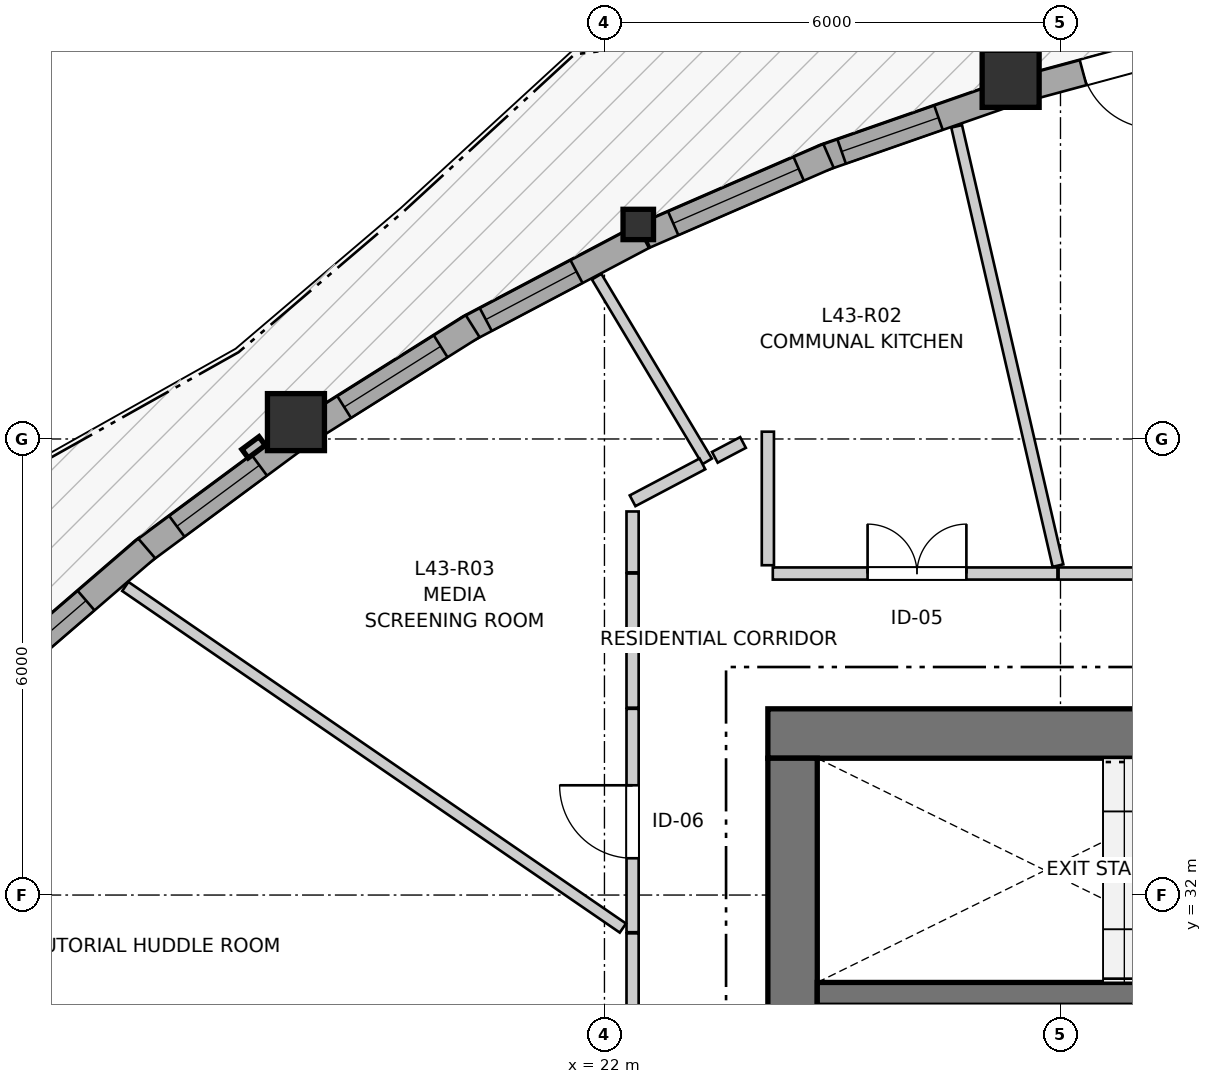
"""IFC4 building model, lengths in metres.
Left out: names, types, materials, properties, quantities, classifications, styles, units other than length and angle.
Written with IfcOpenShell. Run it as: python <this file> out.ifc"""

import sys

from ifc_helpers import new_model, si_unit, direction, frame, frame_2d, origin, origin_2d, place, context, subcontext, project, spatial, rectangle, i_section, extrude, source, transform, mapped, element, fill, save


model = new_model("IFC4")
c1 = context("Model", 3, precision=1e-05, world=origin(), true_north=direction((0.0, 1.0)))
c2 = subcontext(c1, "Body", "Model", "MODEL_VIEW")
j1 = project(units=[si_unit("LENGTHUNIT", "METRE"), si_unit("PLANEANGLEUNIT", "RADIAN")], contexts=[c1])
p1 = place(None, origin())
s1 = spatial("IfcSite", under=j1, at=p1, CompositionType="ELEMENT")
p2 = place(p1, origin())
s2 = spatial("IfcBuilding", under=s1, at=p2, CompositionType="ELEMENT")
p3 = place(p2, frame((0.0, 0.0, 145.8)))
s3 = spatial("IfcBuildingStorey", under=s2, at=p3, CompositionType="ELEMENT", Elevation=145.8)
p4 = place(p3, frame((36.55, 34.125, 0.0), z_axis=(0.0, 0.0, 1.0), x_axis=(-1.0, 0.0, 0.0)))
e1 = element("IfcWall", 1, at=p4, inside=s3, PredefinedType="SHEAR", context=c2, shape_type="SweptSolid", body=[
    extrude(rectangle(XDim=12.4, YDim=0.65, at=frame_2d((6.2, 0.0))), origin(), (0.0, 0.0, 1.0), 2.95),
])
p5 = place(p3, frame((24.475, 33.8, 0.0), z_axis=(0.0, 0.0, 1.0), x_axis=(0.0, -1.0, 0.0)))
e2 = element("IfcWall", 2, at=p5, inside=s3, PredefinedType="SHEAR", context=c2, shape_type="SweptSolid", body=[
    extrude(rectangle(XDim=15.6, YDim=0.65, at=frame_2d((7.8, 0.0))), origin(), (0.0, 0.0, 1.0), 2.95),
])
p6 = place(p5, frame((7.05, 0.0, 0.0)))
e3 = element("IfcOpeningElement", 3, at=p6, cuts=e2, PredefinedType="OPENING", context=c2, shape_type="SweptSolid", body=[
    extrude(rectangle(XDim=1.5, YDim=2.15, at=frame_2d((0.75, 1.075))), frame((0.0, 0.335, 0.0), z_axis=(0.0, -1.0, 0.0), x_axis=(1.0, 0.0, 0.0)), (0.0, 0.0, 1.0), 0.67),
])
p7 = place(p5, frame((3.52, 0.0, 0.0)))
e4 = element("IfcOpeningElement", 4, at=p7, cuts=e2, PredefinedType="OPENING", context=c2, shape_type="SweptSolid", body=[
    extrude(rectangle(XDim=0.86, YDim=2.05, at=frame_2d((0.43, 1.025))), frame((0.0, 0.335, 0.0), z_axis=(0.0, -1.0, 0.0), x_axis=(1.0, 0.0, 0.0)), (0.0, 0.0, 1.0), 0.67),
])
p8 = place(p5, frame((11.22, 0.0, 0.0)))
e5 = element("IfcOpeningElement", 5, at=p8, cuts=e2, PredefinedType="OPENING", context=c2, shape_type="SweptSolid", body=[
    extrude(rectangle(XDim=0.86, YDim=2.05, at=frame_2d((0.43, 1.025))), frame((0.0, 0.335, 0.0), z_axis=(0.0, -1.0, 0.0), x_axis=(1.0, 0.0, 0.0)), (0.0, 0.0, 1.0), 0.67),
])
p9 = place(p3, frame((24.8, 30.7, 0.0), z_axis=(0.0, 0.0, 1.0), x_axis=(1.0, 0.0, 0.0)))
e6 = element("IfcWall", 6, at=p9, inside=s3, PredefinedType="SHEAR", context=c2, shape_type="SweptSolid", body=[
    extrude(rectangle(XDim=11.1, YDim=0.3, at=frame_2d((5.55, 0.0))), origin(), (0.0, 0.0, 1.0), 2.95),
])
p10 = place(p9, frame((6.22, 0.0, 0.0)))
e7 = element("IfcOpeningElement", 7, at=p10, cuts=e6, PredefinedType="OPENING", context=c2, shape_type="SweptSolid", body=[
    extrude(rectangle(XDim=0.98, YDim=2.15, at=frame_2d((0.49, 1.075))), frame((0.0, 0.16, 0.0), z_axis=(0.0, -1.0, 0.0), x_axis=(1.0, 0.0, 0.0)), (0.0, 0.0, 1.0), 0.32),
])
p11 = place(p9, frame((9.15, 0.0, 0.0)))
e8 = element("IfcOpeningElement", 8, at=p11, cuts=e6, PredefinedType="OPENING", context=c2, shape_type="SweptSolid", body=[
    extrude(rectangle(XDim=1.15, YDim=2.15, at=frame_2d((0.575, 1.075))), frame((0.0, 0.16, 0.0), z_axis=(0.0, -1.0, 0.0), x_axis=(1.0, 0.0, 0.0)), (0.0, 0.0, 1.0), 0.32),
])
m1 = source(origin(), c2, "Body", "SweptSolid", [
    extrude(rectangle(XDim=0.75, YDim=0.75, at=origin_2d()), origin(), (0.0, 0.0, 1.0), 2.95),
])
p12 = place(p3, frame((27.344, 42.738, 0.0), z_axis=(0.0, 0.0, 1.0), x_axis=(1.0, 0.0, 0.0)))
e9 = element("IfcColumn", 9, at=p12, inside=s3, PredefinedType="COLUMN", context=c2, shape_type="MappedRepresentation", body=[
    mapped(m1, transform((0.0, 0.0, 0.0), x_axis=(1.0, 0.0, 0.0), y_axis=(0.0, 1.0, 0.0), z_axis=(0.0, 0.0, 1.0), scale=1.0)),
])
m2 = source(origin(), c2, "Body", "SweptSolid", [
    extrude(i_section(OverallWidth=0.401, OverallDepth=0.399, WebThickness=0.023, FlangeThickness=0.036, FilletRadius=0.015, at=origin_2d()), origin(), (0.0, 0.0, 1.0), 2.95),
])
p13 = place(p3, frame((22.445, 40.822, 0.0), z_axis=(0.0, 0.0, 1.0), x_axis=(1.0, 0.0, 0.0)))
e10 = element("IfcColumn", 10, at=p13, inside=s3, PredefinedType="PILASTER", context=c2, shape_type="MappedRepresentation", body=[
    mapped(m2, transform((0.0, 0.0, 0.0), x_axis=(1.0, 0.0, 0.0), y_axis=(0.0, 1.0, 0.0), z_axis=(0.0, 0.0, 1.0), scale=1.0)),
])
p14 = place(p3, frame((17.941, 38.222, 0.0), z_axis=(0.0, 0.0, 1.0), x_axis=(1.0, 0.0, 0.0)))
e11 = element("IfcColumn", 11, at=p14, inside=s3, PredefinedType="COLUMN", context=c2, shape_type="MappedRepresentation", body=[
    mapped(m1, transform((0.0, 0.0, 0.0), x_axis=(1.0, 0.0, 0.0), y_axis=(0.0, 1.0, 0.0), z_axis=(0.0, 0.0, 1.0), scale=1.0)),
])
p15 = place(p3, frame((30.023, 43.285, 0.0), z_axis=(0.0, 0.0, 1.0), x_axis=(-0.965478241218, -0.260483714913, 0.0)))
e12 = element("IfcWall", 12, at=p15, inside=s3, PredefinedType="SOLIDWALL", context=c2, shape_type="SweptSolid", body=[
    extrude(rectangle(XDim=2.574, YDim=0.34, at=frame_2d((1.287, 0.0))), origin(), (0.0, 0.0, 1.0), 2.53),
])
p16 = place(p15, frame((0.787, 0.0, 0.0)))
e13 = element("IfcOpeningElement", 13, at=p16, cuts=e12, PredefinedType="OPENING", context=c2, shape_type="SweptSolid", body=[
    extrude(rectangle(XDim=1.0, YDim=2.1, at=frame_2d((0.5, 1.05))), frame((0.0, 0.18, 0.0), z_axis=(0.0, -1.0, 0.0), x_axis=(1.0, 0.0, 0.0)), (0.0, 0.0, 1.0), 0.36),
])
p17 = place(p3, frame((27.254, 42.527, 0.0), z_axis=(0.0, 0.0, 1.0), x_axis=(-0.944140843313, -0.329542209721, 0.0)))
e14 = element("IfcWall", 14, at=p17, inside=s3, PredefinedType="SOLIDWALL", context=c2, shape_type="SweptSolid", body=[
    extrude(rectangle(XDim=2.53, YDim=0.34, at=frame_2d((1.265, 0.0))), origin(), (0.0, 0.0, 1.0), 2.53),
])
p18 = place(p17, frame((0.909, 0.0, 0.82)))
e15 = element("IfcOpeningElement", 15, at=p18, cuts=e14, PredefinedType="OPENING", context=c2, shape_type="SweptSolid", body=[
    extrude(rectangle(XDim=1.35, YDim=1.45, at=frame_2d((0.675, 0.725))), frame((0.0, 0.18, 0.0), z_axis=(0.0, -1.0, 0.0), x_axis=(1.0, 0.0, 0.0)), (0.0, 0.0, 1.0), 0.36),
])
p19 = place(p3, frame((24.948, 41.725, 0.0), z_axis=(0.0, 0.0, 1.0), x_axis=(-0.917067110524, -0.398732886523, 0.0)))
e16 = element("IfcWall", 16, at=p19, inside=s3, PredefinedType="SOLIDWALL", context=c2, shape_type="SweptSolid", body=[
    extrude(rectangle(XDim=2.635, YDim=0.34, at=frame_2d((1.318, 0.0))), origin(), (0.0, 0.0, 1.0), 2.53),
])
p20 = place(p19, frame((0.427, 0.0, 0.82)))
e17 = element("IfcOpeningElement", 17, at=p20, cuts=e16, PredefinedType="OPENING", context=c2, shape_type="SweptSolid", body=[
    extrude(rectangle(XDim=1.8, YDim=1.45, at=frame_2d((0.9, 0.725))), frame((0.0, 0.18, 0.0), z_axis=(0.0, -1.0, 0.0), x_axis=(1.0, 0.0, 0.0)), (0.0, 0.0, 1.0), 0.36),
])
p21 = place(p3, frame((22.507, 40.663, 0.0), z_axis=(0.0, 0.0, 1.0), x_axis=(-0.884410392718, -0.466710035517, 0.0)))
e18 = element("IfcWall", 18, at=p21, inside=s3, PredefinedType="SOLIDWALL", context=c2, shape_type="SweptSolid", body=[
    extrude(rectangle(XDim=2.62, YDim=0.34, at=frame_2d((1.31, 0.0))), origin(), (0.0, 0.0, 1.0), 2.53),
])
p22 = place(p21, frame((0.988, 0.0, 0.82)))
e19 = element("IfcOpeningElement", 19, at=p22, cuts=e18, PredefinedType="OPENING", context=c2, shape_type="SweptSolid", body=[
    extrude(rectangle(XDim=1.35, YDim=1.45, at=frame_2d((0.675, 0.725))), frame((0.0, 0.18, 0.0), z_axis=(0.0, -1.0, 0.0), x_axis=(1.0, 0.0, 0.0)), (0.0, 0.0, 1.0), 0.36),
])
p23 = place(p3, frame((20.266, 39.484, 0.0), z_axis=(0.0, 0.0, 1.0), x_axis=(-0.84647717658, -0.532425008363, 0.0)))
e20 = element("IfcWall", 20, at=p23, inside=s3, PredefinedType="SOLIDWALL", context=c2, shape_type="SweptSolid", body=[
    extrude(rectangle(XDim=2.485, YDim=0.34, at=frame_2d((1.243, 0.0))), origin(), (0.0, 0.0, 1.0), 2.53),
])
p24 = place(p23, frame((0.498, 0.0, 0.82)))
e21 = element("IfcOpeningElement", 21, at=p24, cuts=e20, PredefinedType="OPENING", context=c2, shape_type="SweptSolid", body=[
    extrude(rectangle(XDim=1.5, YDim=1.45, at=frame_2d((0.75, 0.725))), frame((0.0, 0.18, 0.0), z_axis=(0.0, -1.0, 0.0), x_axis=(1.0, 0.0, 0.0)), (0.0, 0.0, 1.0), 0.36),
])
p25 = place(p3, frame((17.917, 37.993, 0.0), z_axis=(0.0, 0.0, 1.0), x_axis=(-0.803792400414, -0.594909889846, 0.0)))
e22 = element("IfcWall", 22, at=p25, inside=s3, PredefinedType="SOLIDWALL", context=c2, shape_type="SweptSolid", body=[
    extrude(rectangle(XDim=2.5, YDim=0.34, at=frame_2d((1.25, 0.0))), origin(), (0.0, 0.0, 1.0), 2.53),
])
p26 = place(p25, frame((0.57, 0.0, 0.82)))
e23 = element("IfcOpeningElement", 23, at=p26, cuts=e22, PredefinedType="OPENING", context=c2, shape_type="SweptSolid", body=[
    extrude(rectangle(XDim=1.35, YDim=1.45, at=frame_2d((0.675, 0.725))), frame((0.0, 0.18, 0.0), z_axis=(0.0, -1.0, 0.0), x_axis=(1.0, 0.0, 0.0)), (0.0, 0.0, 1.0), 0.36),
])
p27 = place(p3, frame((15.977, 36.561, 0.0), z_axis=(0.0, 0.0, 1.0), x_axis=(-0.757481825022, -0.652856251223, 0.0)))
e24 = element("IfcWall", 24, at=p27, inside=s3, PredefinedType="SOLIDWALL", context=c2, shape_type="SweptSolid", body=[
    extrude(rectangle(XDim=2.665, YDim=0.34, at=frame_2d((1.333, 0.0))), origin(), (0.0, 0.0, 1.0), 2.53),
])
p28 = place(p27, frame((1.052, 0.0, 0.82)))
e25 = element("IfcOpeningElement", 25, at=p28, cuts=e24, PredefinedType="OPENING", context=c2, shape_type="SweptSolid", body=[
    extrude(rectangle(XDim=1.05, YDim=1.45, at=frame_2d((0.525, 0.725))), frame((0.0, 0.18, 0.0), z_axis=(0.0, -1.0, 0.0), x_axis=(1.0, 0.0, 0.0)), (0.0, 0.0, 1.0), 0.36),
])
p29 = place(p3, frame((27.975, 36.23, 0.0), z_axis=(0.0, 0.0, 1.0), x_axis=(1.0, 0.0, 0.0)))
e26 = element("IfcWall", 26, at=p29, inside=s3, PredefinedType="PARTITIONING", context=c2, shape_type="SweptSolid", body=[
    extrude(rectangle(XDim=5.775, YDim=0.16, at=frame_2d((2.887, 0.0))), origin(), (0.0, 0.0, 1.0), 2.588),
])
p30 = place(p29, frame((2.407, 0.0, 0.0)))
e27 = element("IfcOpeningElement", 27, at=p30, cuts=e26, PredefinedType="OPENING", context=c2, shape_type="SweptSolid", body=[
    extrude(rectangle(XDim=0.96, YDim=2.1, at=frame_2d((0.48, 1.05))), frame((0.0, 0.09, 0.0), z_axis=(0.0, -1.0, 0.0), x_axis=(1.0, 0.0, 0.0)), (0.0, 0.0, 1.0), 0.18),
])
p31 = place(p3, frame((24.215, 36.23, 0.0), z_axis=(0.0, 0.0, 1.0), x_axis=(1.0, 0.0, 0.0)))
e28 = element("IfcWall", 28, at=p31, inside=s3, PredefinedType="PARTITIONING", context=c2, shape_type="SweptSolid", body=[
    extrude(rectangle(XDim=3.745, YDim=0.16, at=frame_2d((1.873, 0.0))), origin(), (0.0, 0.0, 1.0), 2.95),
])
p32 = place(p31, frame((1.247, 0.0, 0.0)))
e29 = element("IfcOpeningElement", 29, at=p32, cuts=e28, PredefinedType="OPENING", context=c2, shape_type="SweptSolid", body=[
    extrude(rectangle(XDim=1.3, YDim=2.1, at=frame_2d((0.65, 1.05))), frame((0.0, 0.09, 0.0), z_axis=(0.0, -1.0, 0.0), x_axis=(1.0, 0.0, 0.0)), (0.0, 0.0, 1.0), 0.18),
])
p33 = place(p3, frame((22.37, 27.85, 0.0), z_axis=(0.0, 0.0, 1.0), x_axis=(0.0, 1.0, 0.0)))
e30 = element("IfcWall", 30, at=p33, inside=s3, PredefinedType="PARTITIONING", context=c2, shape_type="SweptSolid", body=[
    extrude(rectangle(XDim=3.646, YDim=0.16, at=frame_2d((1.823, 0.0))), origin(), (0.0, 0.0, 1.0), 2.95),
])
p34 = place(p33, frame((1.194, 0.0, 0.0)))
e31 = element("IfcOpeningElement", 31, at=p34, cuts=e30, PredefinedType="OPENING", context=c2, shape_type="SweptSolid", body=[
    extrude(rectangle(XDim=1.3, YDim=2.1, at=frame_2d((0.65, 1.05))), frame((0.0, 0.09, 0.0), z_axis=(0.0, -1.0, 0.0), x_axis=(1.0, 0.0, 0.0)), (0.0, 0.0, 1.0), 0.18),
])
p35 = place(p3, frame((22.37, 31.511, 0.0), z_axis=(0.0, 0.0, 1.0), x_axis=(0.0, 1.0, 0.0)))
e32 = element("IfcWall", 32, at=p35, inside=s3, PredefinedType="PARTITIONING", context=c2, shape_type="SweptSolid", body=[
    extrude(rectangle(XDim=2.939, YDim=0.16, at=frame_2d((1.469, 0.0))), origin(), (0.0, 0.0, 1.0), 2.95),
])
p36 = place(p35, frame((0.973, 0.0, 0.0)))
e33 = element("IfcOpeningElement", 33, at=p36, cuts=e32, PredefinedType="OPENING", context=c2, shape_type="SweptSolid", body=[
    extrude(rectangle(XDim=0.96, YDim=2.1, at=frame_2d((0.48, 1.05))), frame((0.0, 0.09, 0.0), z_axis=(0.0, -1.0, 0.0), x_axis=(1.0, 0.0, 0.0)), (0.0, 0.0, 1.0), 0.18),
])
p37 = place(p3, frame((15.696, 36.06, 0.0), z_axis=(0.0, 0.0, 1.0), x_axis=(0.824423900824, -0.565972818914, 0.0)))
e34 = element("IfcWall", 34, at=p37, inside=s3, PredefinedType="PARTITIONING", context=c2, shape_type="SweptSolid", body=[
    extrude(rectangle(XDim=7.941, YDim=0.145, at=frame_2d((3.97, 0.0))), origin(), (0.0, 0.0, 1.0), 2.95),
])
p38 = place(p3, frame((26.634, 42.113, 0.0), z_axis=(0.0, 0.0, 1.0), x_axis=(0.224790361783, -0.97440714963, 0.0)))
e35 = element("IfcWall", 35, at=p38, inside=s3, PredefinedType="PARTITIONING", context=c2, shape_type="SweptSolid", body=[
    extrude(rectangle(XDim=5.931, YDim=0.145, at=frame_2d((2.966, 0.0))), origin(), (0.0, 0.0, 1.0), 2.95),
])
p39 = place(p3, frame((21.897, 40.135, 0.0), z_axis=(0.0, 0.0, 1.0), x_axis=(0.513392323606, -0.858154020012, 0.0)))
e36 = element("IfcWall", 36, at=p39, inside=s3, PredefinedType="PARTITIONING", context=c2, shape_type="SweptSolid", body=[
    extrude(rectangle(XDim=2.832, YDim=0.145, at=frame_2d((1.416, 0.0))), origin(), (0.0, 0.0, 1.0), 2.95),
])
p40 = place(p3, frame((22.37, 34.465, 0.0), z_axis=(0.0, 0.0, 1.0), x_axis=(0.0, 1.0, 0.0)))
e37 = element("IfcWall", 37, at=p40, inside=s3, PredefinedType="PARTITIONING", context=c2, shape_type="SweptSolid", body=[
    extrude(rectangle(XDim=1.765, YDim=0.16, at=frame_2d((0.882, 0.0))), origin(), (0.0, 0.0, 1.0), 2.95),
])
p41 = place(p3, frame((24.15, 36.339, 0.0), z_axis=(0.0, 0.0, 1.0), x_axis=(0.0, 1.0, 0.0)))
e38 = element("IfcWall", 38, at=p41, inside=s3, PredefinedType="PARTITIONING", context=c2, shape_type="SweptSolid", body=[
    extrude(rectangle(XDim=1.757, YDim=0.16, at=frame_2d((0.878, 0.0))), origin(), (0.0, 0.0, 1.0), 2.95),
])
p42 = place(p3, frame((22.37, 37.187, 0.0), z_axis=(0.0, 0.0, 1.0), x_axis=(0.884244639112, 0.467024001741, 0.0)))
e39 = element("IfcWall", 39, at=p42, inside=s3, PredefinedType="PARTITIONING", context=c2, shape_type="SweptSolid", body=[
    extrude(rectangle(XDim=1.039, YDim=0.16, at=frame_2d((0.52, 0.0))), origin(), (0.0, 0.0, 1.0), 2.558),
])
p43 = place(p3, frame((22.37, 36.245, 0.0), z_axis=(0.0, 0.0, 1.0), x_axis=(0.0, 1.0, 0.0)))
e40 = element("IfcWall", 40, at=p43, inside=s3, PredefinedType="PARTITIONING", context=c2, shape_type="SweptSolid", body=[
    extrude(rectangle(XDim=0.801, YDim=0.16, at=frame_2d((0.401, 0.0))), origin(), (0.0, 0.0, 1.0), 2.95),
])
p44 = place(p3, frame((23.452, 37.759, 0.0), z_axis=(0.0, 0.0, 1.0), x_axis=(0.884665257528, 0.466226749686, 0.0)))
e41 = element("IfcWall", 41, at=p44, inside=s3, PredefinedType="PARTITIONING", context=c2, shape_type="SweptSolid", body=[
    extrude(rectangle(XDim=0.419, YDim=0.16, at=frame_2d((0.209, 0.0))), origin(), (0.0, 0.0, 1.0), 2.558),
])
m3 = source(origin(), c2, "Body", "SweptSolid", [
    extrude(rectangle(XDim=1.35, YDim=1.45, at=frame_2d((0.675, 0.725))), frame((0.0, 0.03, 0.0), z_axis=(0.0, -1.0, 0.0), x_axis=(1.0, 0.0, 0.0)), (0.0, 0.0, 1.0), 0.06),
])
p45 = place(p18, origin())
e42 = element("IfcWindow", 42, at=p45, inside=s3, PartitioningType="SINGLE_PANEL", PredefinedType="WINDOW", context=c2, shape_type="MappedRepresentation", body=[
    mapped(m3, transform((0.0, 0.0, 0.0), x_axis=(1.0, 0.0, 0.0), y_axis=(0.0, 1.0, 0.0), z_axis=(0.0, 0.0, 1.0), scale=1.0)),
])
fill(e15, e42)
m4 = source(origin(), c2, "Body", "SweptSolid", [
    extrude(rectangle(XDim=1.8, YDim=1.45, at=frame_2d((0.9, 0.725))), frame((0.0, 0.03, 0.0), z_axis=(0.0, -1.0, 0.0), x_axis=(1.0, 0.0, 0.0)), (0.0, 0.0, 1.0), 0.06),
])
p46 = place(p20, origin())
e43 = element("IfcWindow", 43, at=p46, inside=s3, PartitioningType="SINGLE_PANEL", PredefinedType="WINDOW", context=c2, shape_type="MappedRepresentation", body=[
    mapped(m4, transform((0.0, 0.0, 0.0), x_axis=(1.0, 0.0, 0.0), y_axis=(0.0, 1.0, 0.0), z_axis=(0.0, 0.0, 1.0), scale=1.0)),
])
fill(e17, e43)
p47 = place(p22, origin())
e44 = element("IfcWindow", 44, at=p47, inside=s3, PartitioningType="SINGLE_PANEL", PredefinedType="WINDOW", context=c2, shape_type="MappedRepresentation", body=[
    mapped(m3, transform((0.0, 0.0, 0.0), x_axis=(1.0, 0.0, 0.0), y_axis=(0.0, 1.0, 0.0), z_axis=(0.0, 0.0, 1.0), scale=1.0)),
])
fill(e19, e44)
m5 = source(origin(), c2, "Body", "SweptSolid", [
    extrude(rectangle(XDim=1.5, YDim=1.45, at=frame_2d((0.75, 0.725))), frame((0.0, 0.03, 0.0), z_axis=(0.0, -1.0, 0.0), x_axis=(1.0, 0.0, 0.0)), (0.0, 0.0, 1.0), 0.06),
])
p48 = place(p24, origin())
e45 = element("IfcWindow", 45, at=p48, inside=s3, PartitioningType="SINGLE_PANEL", PredefinedType="WINDOW", context=c2, shape_type="MappedRepresentation", body=[
    mapped(m5, transform((0.0, 0.0, 0.0), x_axis=(1.0, 0.0, 0.0), y_axis=(0.0, 1.0, 0.0), z_axis=(0.0, 0.0, 1.0), scale=1.0)),
])
fill(e21, e45)
p49 = place(p26, origin())
e46 = element("IfcWindow", 46, at=p49, inside=s3, PartitioningType="SINGLE_PANEL", PredefinedType="WINDOW", context=c2, shape_type="MappedRepresentation", body=[
    mapped(m3, transform((0.0, 0.0, 0.0), x_axis=(1.0, 0.0, 0.0), y_axis=(0.0, 1.0, 0.0), z_axis=(0.0, 0.0, 1.0), scale=1.0)),
])
fill(e23, e46)
m6 = source(origin(), c2, "Body", "SweptSolid", [
    extrude(rectangle(XDim=1.05, YDim=1.45, at=frame_2d((0.525, 0.725))), frame((0.0, 0.03, 0.0), z_axis=(0.0, -1.0, 0.0), x_axis=(1.0, 0.0, 0.0)), (0.0, 0.0, 1.0), 0.06),
])
p50 = place(p28, origin())
e47 = element("IfcWindow", 47, at=p50, inside=s3, PartitioningType="SINGLE_PANEL", PredefinedType="WINDOW", context=c2, shape_type="MappedRepresentation", body=[
    mapped(m6, transform((0.0, 0.0, 0.0), x_axis=(1.0, 0.0, 0.0), y_axis=(0.0, 1.0, 0.0), z_axis=(0.0, 0.0, 1.0), scale=1.0)),
])
fill(e25, e47)
m7 = source(origin(), c2, "Body", "SweptSolid", [
    extrude(rectangle(XDim=1.0, YDim=2.1, at=frame_2d((0.5, 1.05))), frame((0.0, 0.025, 0.0), z_axis=(0.0, -1.0, 0.0), x_axis=(1.0, 0.0, 0.0)), (0.0, 0.0, 1.0), 0.05),
])
p51 = place(p16, origin())
e48 = element("IfcDoor", 48, at=p51, inside=s3, OperationType="SINGLE_SWING_LEFT", PredefinedType="DOOR", context=c2, shape_type="MappedRepresentation", body=[
    mapped(m7, transform((0.0, 0.0, 0.0), x_axis=(1.0, 0.0, 0.0), y_axis=(0.0, 1.0, 0.0), z_axis=(0.0, 0.0, 1.0), scale=1.0)),
])
fill(e13, e48)
m8 = source(origin(), c2, "Body", "SweptSolid", [
    extrude(rectangle(XDim=1.3, YDim=2.1, at=frame_2d((0.65, 1.05))), frame((0.0, 0.025, 0.0), z_axis=(0.0, -1.0, 0.0), x_axis=(1.0, 0.0, 0.0)), (0.0, 0.0, 1.0), 0.05),
])
p52 = place(p32, origin())
e49 = element("IfcDoor", 49, at=p52, inside=s3, OperationType="DOUBLE_DOOR_SINGLE_SWING", PredefinedType="DOOR", context=c2, shape_type="MappedRepresentation", body=[
    mapped(m8, transform((0.0, 0.0, 0.0), x_axis=(1.0, 0.0, 0.0), y_axis=(0.0, 1.0, 0.0), z_axis=(0.0, 0.0, 1.0), scale=1.0)),
])
fill(e29, e49)
m9 = source(origin(), c2, "Body", "SweptSolid", [
    extrude(rectangle(XDim=0.96, YDim=2.1, at=frame_2d((0.48, 1.05))), frame((0.0, 0.025, 0.0), z_axis=(0.0, -1.0, 0.0), x_axis=(1.0, 0.0, 0.0)), (0.0, 0.0, 1.0), 0.05),
])
p53 = place(p36, origin())
e50 = element("IfcDoor", 50, at=p53, inside=s3, OperationType="SINGLE_SWING_RIGHT", PredefinedType="DOOR", context=c2, shape_type="MappedRepresentation", body=[
    mapped(m9, transform((0.0, 0.0, 0.0), x_axis=(1.0, 0.0, 0.0), y_axis=(0.0, 1.0, 0.0), z_axis=(0.0, 0.0, 1.0), scale=1.0)),
])
fill(e33, e50)
save(model, sys.argv[1])
